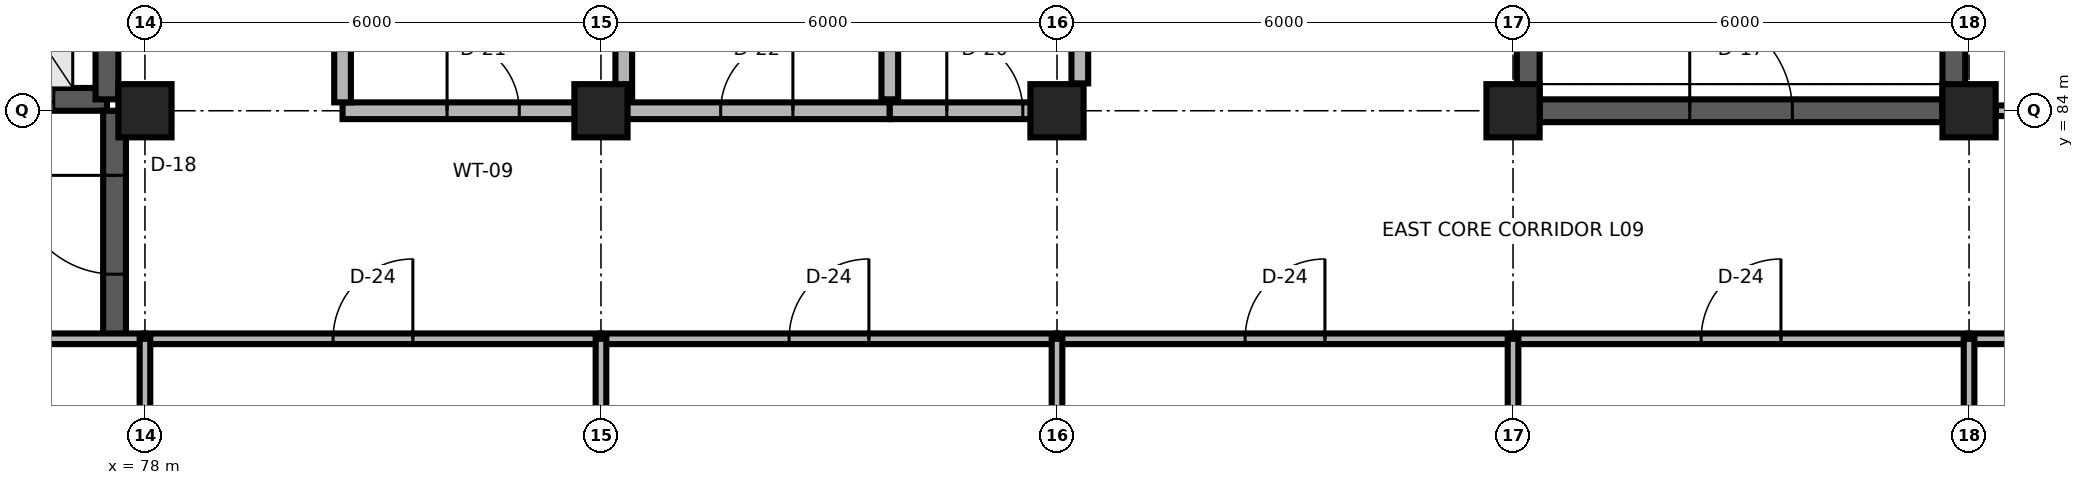
"""IFC4 building model, lengths in metres.
Left out: names, types, materials, properties, quantities, classifications, styles, units other than length and angle.
Written with IfcOpenShell. Run it as: python <this file> out.ifc"""

import sys

from ifc_helpers import new_model, si_unit, direction, frame, frame_2d, origin, origin_2d, place, context, subcontext, project, spatial, rectangle, extrude, element, fill, save


model = new_model("IFC4")
c1 = context("Model", 3, precision=1e-05, world=origin(), true_north=direction((0.0, 1.0)))
c2 = subcontext(c1, "Body", "Model", "MODEL_VIEW")
j1 = project(units=[si_unit("LENGTHUNIT", "METRE"), si_unit("PLANEANGLEUNIT", "RADIAN")], contexts=[c1])
p1 = place(None, origin())
s1 = spatial("IfcSite", under=j1, at=p1, CompositionType="ELEMENT")
p2 = place(p1, origin())
s2 = spatial("IfcBuilding", under=s1, at=p2, CompositionType="ELEMENT")
p3 = place(p2, frame((0.0, 0.0, 36.6)))
s3 = spatial("IfcBuildingStorey", under=s2, at=p3, CompositionType="ELEMENT", Elevation=36.6)
for number, where, z_axis, x_axis in (
    (1, (78.0, 84.0, 0.0), (0.0, 0.0, 1.0), (1.0, 0.0, 0.0)),
    (2, (84.0, 84.0, 0.0), (0.0, 0.0, 1.0), (1.0, 0.0, 0.0)),
    (3, (90.0, 84.0, 0.0), (0.0, 0.0, 1.0), (1.0, 0.0, 0.0)),
    (4, (96.0, 84.0, 0.0), (0.0, 0.0, 1.0), (1.0, 0.0, 0.0)),
    (5, (102.0, 84.0, 0.0), (0.0, 0.0, 1.0), (1.0, 0.0, 0.0)),
):
    element("IfcColumn", number, at=place(p3, frame(where, z_axis=z_axis, x_axis=x_axis)), inside=s3, PredefinedType="COLUMN", context=c2, shape_type="SweptSolid", body=[
        extrude(rectangle(XDim=0.7, YDim=0.7, at=origin_2d()), origin(), (0.0, 0.0, 1.0), 3.9),
    ])
p4 = place(p3, frame((96.35, 84.0, 0.0), z_axis=(0.0, 0.0, 1.0), x_axis=(1.0, 0.0, 0.0)))
e6 = element("IfcWall", 6, at=p4, inside=s3, PredefinedType="SHEAR", context=c2, shape_type="SweptSolid", body=[
    extrude(rectangle(XDim=5.3, YDim=0.3, at=frame_2d((2.65, 0.0))), origin(), (0.0, 0.0, 1.0), 3.66),
])
p5 = place(p4, frame((1.975, 0.0, 0.0)))
e7 = element("IfcOpeningElement", 7, at=p5, cuts=e6, PredefinedType="OPENING", context=c2, shape_type="SweptSolid", body=[
    extrude(rectangle(XDim=1.35, YDim=2.2, at=frame_2d((0.675, 1.1))), frame((0.0, 0.165, 0.0), z_axis=(0.0, -1.0, 0.0), x_axis=(1.0, 0.0, 0.0)), (0.0, 0.0, 1.0), 0.33),
])
for number, where, z_axis, x_axis in (
    (8, (96.2, 84.0, 0.0), (0.0, 0.0, 1.0), (0.0, 1.0, 0.0)),
    (9, (101.8, 84.0, 0.0), (0.0, 0.0, 1.0), (0.0, 1.0, 0.0)),
):
    element("IfcWall", number, at=place(p3, frame(where, z_axis=z_axis, x_axis=x_axis)), inside=s3, PredefinedType="SHEAR", context=c2, shape_type="SweptSolid", body=[
        extrude(rectangle(XDim=11.8, YDim=0.3, at=frame_2d((5.9, 0.0))), origin(), (0.0, 0.0, 1.0), 3.74),
    ])
p6 = place(p3, frame((75.0, 84.15, 0.0), z_axis=(0.0, 0.0, 1.0), x_axis=(1.0, 0.0, 0.0)))
e10 = element("IfcWall", 10, at=p6, inside=s3, PredefinedType="SHEAR", context=c2, shape_type="SweptSolid", body=[
    extrude(rectangle(XDim=2.5, YDim=0.3, at=frame_2d((1.25, 0.0))), origin(), (0.0, 0.0, 1.0), 3.74),
])
p7 = place(p6, frame((0.7, 0.0, 0.0)))
e11 = element("IfcOpeningElement", 11, at=p7, cuts=e10, PredefinedType="OPENING", context=c2, shape_type="SweptSolid", body=[
    extrude(rectangle(XDim=1.1, YDim=2.1, at=frame_2d((0.55, 1.05))), frame((0.0, 0.165, 0.0), z_axis=(0.0, -1.0, 0.0), x_axis=(1.0, 0.0, 0.0)), (0.0, 0.0, 1.0), 0.33),
])
p8 = place(p3, frame((77.5, 84.15, 0.0), z_axis=(0.0, 0.0, 1.0), x_axis=(0.0, 1.0, 0.0)))
e12 = element("IfcWall", 12, at=p8, inside=s3, PredefinedType="SHEAR", context=c2, shape_type="SweptSolid", body=[
    extrude(rectangle(XDim=3.4, YDim=0.3, at=frame_2d((1.7, 0.0))), origin(), (0.0, 0.0, 1.0), 3.74),
])
p9 = place(p3, frame((77.6, 81.0, 0.0), z_axis=(0.0, 0.0, 1.0), x_axis=(0.0, 1.0, 0.0)))
e13 = element("IfcWall", 13, at=p9, inside=s3, PredefinedType="SHEAR", context=c2, shape_type="SweptSolid", body=[
    extrude(rectangle(XDim=3.0, YDim=0.3, at=frame_2d((1.5, 0.0))), origin(), (0.0, 0.0, 1.0), 3.74),
])
p10 = place(p9, frame((0.85, 0.0, 0.0)))
e14 = element("IfcOpeningElement", 14, at=p10, cuts=e13, PredefinedType="OPENING", context=c2, shape_type="SweptSolid", body=[
    extrude(rectangle(XDim=1.3, YDim=2.2, at=frame_2d((0.65, 1.1))), frame((0.0, 0.165, 0.0), z_axis=(0.0, -1.0, 0.0), x_axis=(1.0, 0.0, 0.0)), (0.0, 0.0, 1.0), 0.33),
])
p11 = place(p3, frame((80.6, 84.0, 0.0), z_axis=(0.0, 0.0, 1.0), x_axis=(1.0, 0.0, 0.0)))
e15 = element("IfcWall", 15, at=p11, inside=s3, PredefinedType="PARTITIONING", context=c2, shape_type="SweptSolid", body=[
    extrude(rectangle(XDim=3.7, YDim=0.22, at=frame_2d((1.85, 0.0))), origin(), (0.0, 0.0, 1.0), 3.348),
])
p12 = place(p11, frame((1.375, 0.0, 0.0)))
e16 = element("IfcOpeningElement", 16, at=p12, cuts=e15, PredefinedType="OPENING", context=c2, shape_type="SweptSolid", body=[
    extrude(rectangle(XDim=0.95, YDim=2.15, at=frame_2d((0.475, 1.075))), frame((0.0, 0.125, 0.0), z_axis=(0.0, -1.0, 0.0), x_axis=(1.0, 0.0, 0.0)), (0.0, 0.0, 1.0), 0.25),
])
p13 = place(p3, frame((84.3, 84.0, 0.0), z_axis=(0.0, 0.0, 1.0), x_axis=(1.0, 0.0, 0.0)))
e17 = element("IfcWall", 17, at=p13, inside=s3, PredefinedType="PARTITIONING", context=c2, shape_type="SweptSolid", body=[
    extrude(rectangle(XDim=3.5, YDim=0.22, at=frame_2d((1.75, 0.0))), origin(), (0.0, 0.0, 1.0), 3.348),
])
p14 = place(p13, frame((1.275, 0.0, 0.0)))
e18 = element("IfcOpeningElement", 18, at=p14, cuts=e17, PredefinedType="OPENING", context=c2, shape_type="SweptSolid", body=[
    extrude(rectangle(XDim=0.95, YDim=2.1, at=frame_2d((0.475, 1.05))), frame((0.0, 0.125, 0.0), z_axis=(0.0, -1.0, 0.0), x_axis=(1.0, 0.0, 0.0)), (0.0, 0.0, 1.0), 0.25),
])
p15 = place(p3, frame((87.8, 84.0, 0.0), z_axis=(0.0, 0.0, 1.0), x_axis=(1.0, 0.0, 0.0)))
e19 = element("IfcWall", 19, at=p15, inside=s3, PredefinedType="PARTITIONING", context=c2, shape_type="SweptSolid", body=[
    extrude(rectangle(XDim=2.5, YDim=0.22, at=frame_2d((1.25, 0.0))), origin(), (0.0, 0.0, 1.0), 3.348),
])
p16 = place(p15, frame((0.75, 0.0, 0.0)))
e20 = element("IfcOpeningElement", 20, at=p16, cuts=e19, PredefinedType="OPENING", context=c2, shape_type="SweptSolid", body=[
    extrude(rectangle(XDim=1.0, YDim=2.15, at=frame_2d((0.5, 1.075))), frame((0.0, 0.125, 0.0), z_axis=(0.0, -1.0, 0.0), x_axis=(1.0, 0.0, 0.0)), (0.0, 0.0, 1.0), 0.25),
])
for number, where, z_axis, x_axis in (
    (21, (84.3, 84.15, 0.0), (0.0, 0.0, 1.0), (0.0, 1.0, 0.0)),
    (22, (87.8, 84.15, 0.0), (0.0, 0.0, 1.0), (0.0, 1.0, 0.0)),
):
    element("IfcWall", number, at=place(p3, frame(where, z_axis=z_axis, x_axis=x_axis)), inside=s3, PredefinedType="PARTITIONING", context=c2, shape_type="SweptSolid", body=[
        extrude(rectangle(XDim=5.0, YDim=0.22, at=frame_2d((2.5, 0.0))), origin(), (0.0, 0.0, 1.0), 3.74),
    ])
p17 = place(p3, frame((72.0, 81.0, 0.0), z_axis=(0.0, 0.0, 1.0), x_axis=(1.0, 0.0, 0.0)))
e23 = element("IfcWall", 23, at=p17, inside=s3, PredefinedType="PARTITIONING", context=c2, shape_type="SweptSolid", body=[
    extrude(rectangle(XDim=6.0, YDim=0.14, at=frame_2d((3.0, 0.0))), origin(), (0.0, 0.0, 1.0), 3.74),
])
p18 = place(p17, frame((2.475, 0.0, 0.0)))
e24 = element("IfcOpeningElement", 24, at=p18, cuts=e23, PredefinedType="OPENING", context=c2, shape_type="SweptSolid", body=[
    extrude(rectangle(XDim=1.05, YDim=2.25, at=frame_2d((0.525, 1.125))), frame((0.0, 0.085, 0.0), z_axis=(0.0, -1.0, 0.0), x_axis=(1.0, 0.0, 0.0)), (0.0, 0.0, 1.0), 0.17),
])
p19 = place(p3, frame((78.0, 81.0, 0.0), z_axis=(0.0, 0.0, 1.0), x_axis=(1.0, 0.0, 0.0)))
e25 = element("IfcWall", 25, at=p19, inside=s3, PredefinedType="PARTITIONING", context=c2, shape_type="SweptSolid", body=[
    extrude(rectangle(XDim=6.0, YDim=0.14, at=frame_2d((3.0, 0.0))), origin(), (0.0, 0.0, 1.0), 3.74),
])
p20 = place(p19, frame((2.475, 0.0, 0.0)))
e26 = element("IfcOpeningElement", 26, at=p20, cuts=e25, PredefinedType="OPENING", context=c2, shape_type="SweptSolid", body=[
    extrude(rectangle(XDim=1.05, YDim=2.25, at=frame_2d((0.525, 1.125))), frame((0.0, 0.085, 0.0), z_axis=(0.0, -1.0, 0.0), x_axis=(1.0, 0.0, 0.0)), (0.0, 0.0, 1.0), 0.17),
])
p21 = place(p3, frame((84.0, 81.0, 0.0), z_axis=(0.0, 0.0, 1.0), x_axis=(1.0, 0.0, 0.0)))
e27 = element("IfcWall", 27, at=p21, inside=s3, PredefinedType="PARTITIONING", context=c2, shape_type="SweptSolid", body=[
    extrude(rectangle(XDim=6.0, YDim=0.14, at=frame_2d((3.0, 0.0))), origin(), (0.0, 0.0, 1.0), 3.74),
])
p22 = place(p21, frame((2.475, 0.0, 0.0)))
e28 = element("IfcOpeningElement", 28, at=p22, cuts=e27, PredefinedType="OPENING", context=c2, shape_type="SweptSolid", body=[
    extrude(rectangle(XDim=1.05, YDim=2.25, at=frame_2d((0.525, 1.125))), frame((0.0, 0.085, 0.0), z_axis=(0.0, -1.0, 0.0), x_axis=(1.0, 0.0, 0.0)), (0.0, 0.0, 1.0), 0.17),
])
p23 = place(p3, frame((90.0, 81.0, 0.0), z_axis=(0.0, 0.0, 1.0), x_axis=(1.0, 0.0, 0.0)))
e29 = element("IfcWall", 29, at=p23, inside=s3, PredefinedType="PARTITIONING", context=c2, shape_type="SweptSolid", body=[
    extrude(rectangle(XDim=6.0, YDim=0.14, at=frame_2d((3.0, 0.0))), origin(), (0.0, 0.0, 1.0), 3.74),
])
p24 = place(p23, frame((2.475, 0.0, 0.0)))
e30 = element("IfcOpeningElement", 30, at=p24, cuts=e29, PredefinedType="OPENING", context=c2, shape_type="SweptSolid", body=[
    extrude(rectangle(XDim=1.05, YDim=2.25, at=frame_2d((0.525, 1.125))), frame((0.0, 0.085, 0.0), z_axis=(0.0, -1.0, 0.0), x_axis=(1.0, 0.0, 0.0)), (0.0, 0.0, 1.0), 0.17),
])
p25 = place(p3, frame((96.0, 81.0, 0.0), z_axis=(0.0, 0.0, 1.0), x_axis=(1.0, 0.0, 0.0)))
e31 = element("IfcWall", 31, at=p25, inside=s3, PredefinedType="PARTITIONING", context=c2, shape_type="SweptSolid", body=[
    extrude(rectangle(XDim=6.0, YDim=0.14, at=frame_2d((3.0, 0.0))), origin(), (0.0, 0.0, 1.0), 3.74),
])
p26 = place(p25, frame((2.475, 0.0, 0.0)))
e32 = element("IfcOpeningElement", 32, at=p26, cuts=e31, PredefinedType="OPENING", context=c2, shape_type="SweptSolid", body=[
    extrude(rectangle(XDim=1.05, YDim=2.25, at=frame_2d((0.525, 1.125))), frame((0.0, 0.085, 0.0), z_axis=(0.0, -1.0, 0.0), x_axis=(1.0, 0.0, 0.0)), (0.0, 0.0, 1.0), 0.17),
])
p27 = place(p3, frame((102.0, 81.0, 0.0), z_axis=(0.0, 0.0, 1.0), x_axis=(1.0, 0.0, 0.0)))
e33 = element("IfcWall", 33, at=p27, inside=s3, PredefinedType="PARTITIONING", context=c2, shape_type="SweptSolid", body=[
    extrude(rectangle(XDim=4.3, YDim=0.14, at=frame_2d((2.15, 0.0))), origin(), (0.0, 0.0, 1.0), 3.74),
])
p28 = place(p27, frame((1.625, 0.0, 0.0)))
e34 = element("IfcOpeningElement", 34, at=p28, cuts=e33, PredefinedType="OPENING", context=c2, shape_type="SweptSolid", body=[
    extrude(rectangle(XDim=1.05, YDim=2.25, at=frame_2d((0.525, 1.125))), frame((0.0, 0.085, 0.0), z_axis=(0.0, -1.0, 0.0), x_axis=(1.0, 0.0, 0.0)), (0.0, 0.0, 1.0), 0.17),
])
p29 = place(p3, frame((102.35, 84.0, 0.0), z_axis=(0.0, 0.0, 1.0), x_axis=(1.0, 0.0, 0.0)))
e35 = element("IfcWall", 35, at=p29, inside=s3, PredefinedType="PARTITIONING", context=c2, shape_type="SweptSolid", body=[
    extrude(rectangle(XDim=5.3, YDim=0.14, at=frame_2d((2.65, 0.0))), origin(), (0.0, 0.0, 1.0), 3.348),
])
p30 = place(p29, frame((2.125, 0.0, 0.0)))
e36 = element("IfcOpeningElement", 36, at=p30, cuts=e35, PredefinedType="OPENING", context=c2, shape_type="SweptSolid", body=[
    extrude(rectangle(XDim=1.05, YDim=2.25, at=frame_2d((0.525, 1.125))), frame((0.0, 0.085, 0.0), z_axis=(0.0, -1.0, 0.0), x_axis=(1.0, 0.0, 0.0)), (0.0, 0.0, 1.0), 0.17),
])
for number, where, z_axis, x_axis in (
    (37, (78.0, 72.65, 0.0), (0.0, 0.0, 1.0), (0.0, 1.0, 0.0)),
    (38, (84.0, 72.65, 0.0), (0.0, 0.0, 1.0), (0.0, 1.0, 0.0)),
    (39, (90.0, 72.65, 0.0), (0.0, 0.0, 1.0), (0.0, 1.0, 0.0)),
    (40, (96.0, 72.65, 0.0), (0.0, 0.0, 1.0), (0.0, 1.0, 0.0)),
    (41, (102.0, 72.65, 0.0), (0.0, 0.0, 1.0), (0.0, 1.0, 0.0)),
):
    element("IfcWall", number, at=place(p3, frame(where, z_axis=z_axis, x_axis=x_axis)), inside=s3, PredefinedType="PARTITIONING", context=c2, shape_type="SweptSolid", body=[
        extrude(rectangle(XDim=8.35, YDim=0.14, at=frame_2d((4.175, 0.0))), origin(), (0.0, 0.0, 1.0), 3.348),
    ])
p31 = place(p3, frame((80.6, 84.11, 0.0), z_axis=(0.0, 0.0, 1.0), x_axis=(0.0, 1.0, 0.0)))
e42 = element("IfcWall", 42, at=p31, inside=s3, PredefinedType="PARTITIONING", context=c2, shape_type="SweptSolid", body=[
    extrude(rectangle(XDim=4.98, YDim=0.22, at=frame_2d((2.49, 0.0))), origin(), (0.0, 0.0, 1.0), 3.74),
])
p32 = place(p3, frame((90.3, 84.36, 0.0), z_axis=(0.0, 0.0, 1.0), x_axis=(0.0, 1.0, 0.0)))
e43 = element("IfcWall", 43, at=p32, inside=s3, PredefinedType="PARTITIONING", context=c2, shape_type="SweptSolid", body=[
    extrude(rectangle(XDim=4.73, YDim=0.22, at=frame_2d((2.365, 0.0))), origin(), (0.0, 0.0, 1.0), 3.74),
])
p33 = place(p5, origin())
e44 = element("IfcDoor", 44, at=p33, inside=s3, OperationType="SINGLE_SWING_LEFT", PredefinedType="DOOR", context=c2, shape_type="SweptSolid", body=[
    extrude(rectangle(XDim=1.35, YDim=2.2, at=frame_2d((0.675, 1.1))), frame((0.0, 0.025, 0.0), z_axis=(0.0, -1.0, 0.0), x_axis=(1.0, 0.0, 0.0)), (0.0, 0.0, 1.0), 0.05),
])
fill(e7, e44)
p34 = place(p7, origin())
e45 = element("IfcDoor", 45, at=p34, inside=s3, OperationType="DOUBLE_DOOR_SLIDING", PredefinedType="DOOR", context=c2, shape_type="SweptSolid", body=[
    extrude(rectangle(XDim=1.1, YDim=2.1, at=frame_2d((0.55, 1.05))), frame((0.0, 0.025, 0.0), z_axis=(0.0, -1.0, 0.0), x_axis=(1.0, 0.0, 0.0)), (0.0, 0.0, 1.0), 0.05),
])
fill(e11, e45)
p35 = place(p10, origin())
e46 = element("IfcDoor", 46, at=p35, inside=s3, OperationType="SINGLE_SWING_RIGHT", PredefinedType="DOOR", context=c2, shape_type="SweptSolid", body=[
    extrude(rectangle(XDim=1.3, YDim=2.2, at=frame_2d((0.65, 1.1))), frame((0.0, 0.025, 0.0), z_axis=(0.0, -1.0, 0.0), x_axis=(1.0, 0.0, 0.0)), (0.0, 0.0, 1.0), 0.05),
])
fill(e14, e46)
p36 = place(p12, origin())
e47 = element("IfcDoor", 47, at=p36, inside=s3, OperationType="SINGLE_SWING_LEFT", PredefinedType="DOOR", context=c2, shape_type="SweptSolid", body=[
    extrude(rectangle(XDim=0.95, YDim=2.15, at=frame_2d((0.475, 1.075))), frame((0.0, 0.025, 0.0), z_axis=(0.0, -1.0, 0.0), x_axis=(1.0, 0.0, 0.0)), (0.0, 0.0, 1.0), 0.05),
])
fill(e16, e47)
p37 = place(p14, origin())
e48 = element("IfcDoor", 48, at=p37, inside=s3, OperationType="SINGLE_SWING_RIGHT", PredefinedType="DOOR", context=c2, shape_type="SweptSolid", body=[
    extrude(rectangle(XDim=0.95, YDim=2.1, at=frame_2d((0.475, 1.05))), frame((0.0, 0.025, 0.0), z_axis=(0.0, -1.0, 0.0), x_axis=(1.0, 0.0, 0.0)), (0.0, 0.0, 1.0), 0.05),
])
fill(e18, e48)
p38 = place(p16, origin())
e49 = element("IfcDoor", 49, at=p38, inside=s3, OperationType="SINGLE_SWING_LEFT", PredefinedType="DOOR", context=c2, shape_type="SweptSolid", body=[
    extrude(rectangle(XDim=1.0, YDim=2.15, at=frame_2d((0.5, 1.075))), frame((0.0, 0.025, 0.0), z_axis=(0.0, -1.0, 0.0), x_axis=(1.0, 0.0, 0.0)), (0.0, 0.0, 1.0), 0.05),
])
fill(e20, e49)
p39 = place(p20, origin())
e50 = element("IfcDoor", 50, at=p39, inside=s3, OperationType="SINGLE_SWING_RIGHT", PredefinedType="DOOR", context=c2, shape_type="SweptSolid", body=[
    extrude(rectangle(XDim=1.05, YDim=2.25, at=frame_2d((0.525, 1.125))), frame((0.0, 0.025, 0.0), z_axis=(0.0, -1.0, 0.0), x_axis=(1.0, 0.0, 0.0)), (0.0, 0.0, 1.0), 0.05),
])
fill(e26, e50)
p40 = place(p22, origin())
e51 = element("IfcDoor", 51, at=p40, inside=s3, OperationType="SINGLE_SWING_RIGHT", PredefinedType="DOOR", context=c2, shape_type="SweptSolid", body=[
    extrude(rectangle(XDim=1.05, YDim=2.25, at=frame_2d((0.525, 1.125))), frame((0.0, 0.025, 0.0), z_axis=(0.0, -1.0, 0.0), x_axis=(1.0, 0.0, 0.0)), (0.0, 0.0, 1.0), 0.05),
])
fill(e28, e51)
p41 = place(p24, origin())
e52 = element("IfcDoor", 52, at=p41, inside=s3, OperationType="SINGLE_SWING_RIGHT", PredefinedType="DOOR", context=c2, shape_type="SweptSolid", body=[
    extrude(rectangle(XDim=1.05, YDim=2.25, at=frame_2d((0.525, 1.125))), frame((0.0, 0.025, 0.0), z_axis=(0.0, -1.0, 0.0), x_axis=(1.0, 0.0, 0.0)), (0.0, 0.0, 1.0), 0.05),
])
fill(e30, e52)
p42 = place(p26, origin())
e53 = element("IfcDoor", 53, at=p42, inside=s3, OperationType="SINGLE_SWING_RIGHT", PredefinedType="DOOR", context=c2, shape_type="SweptSolid", body=[
    extrude(rectangle(XDim=1.05, YDim=2.25, at=frame_2d((0.525, 1.125))), frame((0.0, 0.025, 0.0), z_axis=(0.0, -1.0, 0.0), x_axis=(1.0, 0.0, 0.0)), (0.0, 0.0, 1.0), 0.05),
])
fill(e32, e53)
save(model, sys.argv[1])
